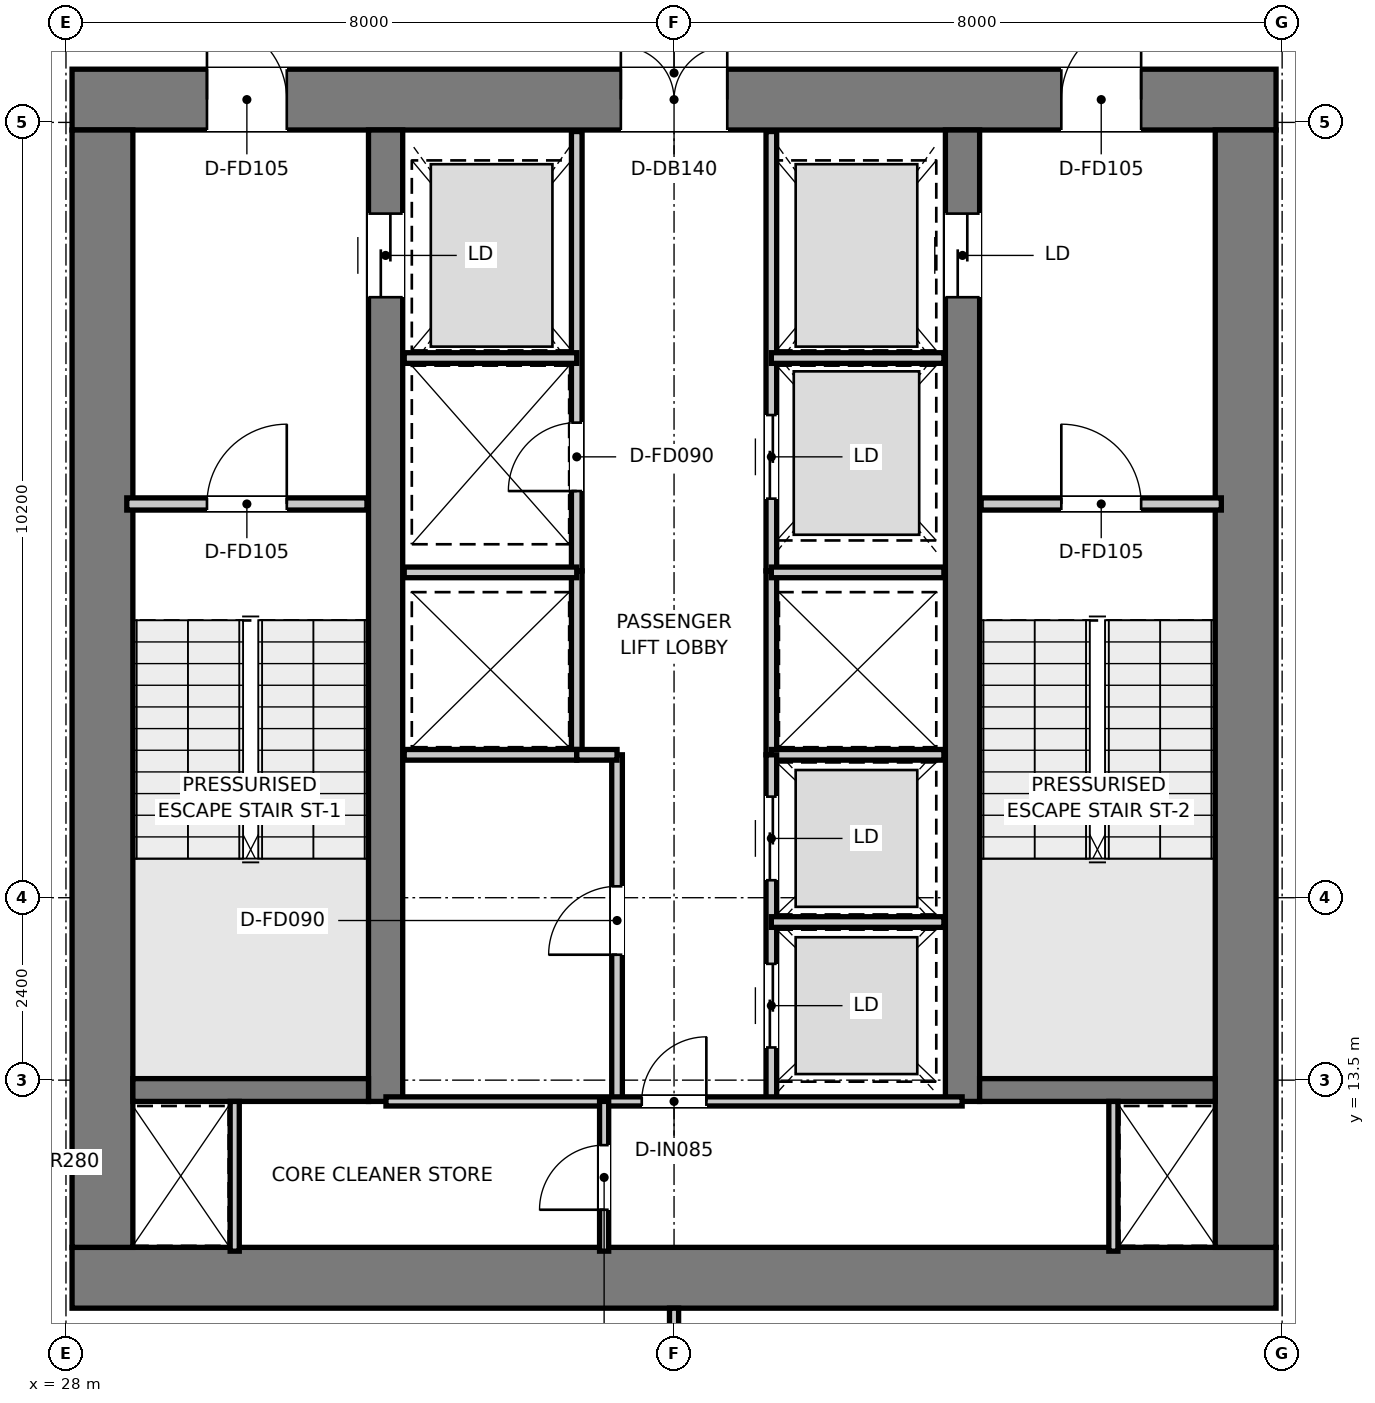
"""IFC4 building model, lengths in metres.
Left out: names, types, materials, properties, quantities, classifications, styles, units other than length and angle.
Written with IfcOpenShell. Run it as: python <this file> out.ifc"""

import sys

from ifc_helpers import new_model, si_unit, direction, frame, frame_2d, origin, place, context, subcontext, project, spatial, rectangle, extrude, element, fill, save


model = new_model("IFC4")
c1 = context("Model", 3, precision=1e-05, world=origin(), true_north=direction((0.0, 1.0)))
c2 = subcontext(c1, "Body", "Model", "MODEL_VIEW")
j1 = project(units=[si_unit("LENGTHUNIT", "METRE"), si_unit("PLANEANGLEUNIT", "RADIAN")], contexts=[c1])
p1 = place(None, origin())
s1 = spatial("IfcSite", under=j1, at=p1, CompositionType="ELEMENT")
p2 = place(p1, origin())
s2 = spatial("IfcBuilding", under=s1, at=p2, CompositionType="ELEMENT")
p3 = place(p2, frame((0.0, 0.0, 231.0)))
s3 = spatial("IfcBuildingStorey", under=s2, at=p3, CompositionType="ELEMENT", Elevation=231.0)
p4 = place(p3, frame((28.08, 10.9, 0.0), z_axis=(0.0, 0.0, 1.0), x_axis=(1.0, 0.0, 0.0)))
e1 = element("IfcWall", 1, at=p4, inside=s3, PredefinedType="SHEAR", context=c2, shape_type="SweptSolid", body=[
    extrude(rectangle(XDim=15.84, YDim=0.8, at=frame_2d((7.92, 0.0))), origin(), (0.0, 0.0, 1.0), 3.95),
])
p5 = place(p3, frame((28.08, 26.4, 0.0), z_axis=(0.0, 0.0, 1.0), x_axis=(1.0, 0.0, 0.0)))
e2 = element("IfcWall", 2, at=p5, inside=s3, PredefinedType="SHEAR", context=c2, shape_type="SweptSolid", body=[
    extrude(rectangle(XDim=15.84, YDim=0.8, at=frame_2d((7.92, 0.0))), origin(), (0.0, 0.0, 1.0), 3.95),
])
p6 = place(p5, frame((7.22, 0.0, 0.0)))
e3 = element("IfcOpeningElement", 3, at=p6, cuts=e2, PredefinedType="OPENING", context=c2, shape_type="SweptSolid", body=[
    extrude(rectangle(XDim=1.4, YDim=2.2, at=frame_2d((0.7, 1.1))), frame((0.0, 0.41, 0.0), z_axis=(0.0, -1.0, 0.0), x_axis=(1.0, 0.0, 0.0)), (0.0, 0.0, 1.0), 0.82),
])
p7 = place(p5, frame((1.775, 0.0, 0.0)))
e4 = element("IfcOpeningElement", 4, at=p7, cuts=e2, PredefinedType="OPENING", context=c2, shape_type="SweptSolid", body=[
    extrude(rectangle(XDim=1.05, YDim=2.1, at=frame_2d((0.525, 1.05))), frame((0.0, 0.41, 0.0), z_axis=(0.0, -1.0, 0.0), x_axis=(1.0, 0.0, 0.0)), (0.0, 0.0, 1.0), 0.82),
])
p8 = place(p5, frame((13.015, 0.0, 0.0)))
e5 = element("IfcOpeningElement", 5, at=p8, cuts=e2, PredefinedType="OPENING", context=c2, shape_type="SweptSolid", body=[
    extrude(rectangle(XDim=1.05, YDim=2.1, at=frame_2d((0.525, 1.05))), frame((0.0, 0.41, 0.0), z_axis=(0.0, -1.0, 0.0), x_axis=(1.0, 0.0, 0.0)), (0.0, 0.0, 1.0), 0.82),
])
for number, where, z_axis, x_axis in (
    (6, (28.48, 11.3, 0.0), (0.0, 0.0, 1.0), (0.0, 1.0, 0.0)),
    (7, (43.52, 11.3, 0.0), (0.0, 0.0, 1.0), (0.0, 1.0, 0.0)),
):
    element("IfcWall", number, at=place(p3, frame(where, z_axis=z_axis, x_axis=x_axis)), inside=s3, PredefinedType="SHEAR", context=c2, shape_type="SweptSolid", body=[
        extrude(rectangle(XDim=14.7, YDim=0.8, at=frame_2d((7.35, 0.0))), origin(), (0.0, 0.0, 1.0), 3.95),
    ])
p9 = place(p3, frame((32.205, 13.22, 0.0), z_axis=(0.0, 0.0, 1.0), x_axis=(0.0, 1.0, 0.0)))
e8 = element("IfcWall", 8, at=p9, inside=s3, PredefinedType="SHEAR", context=c2, shape_type="SweptSolid", body=[
    extrude(rectangle(XDim=12.78, YDim=0.45, at=frame_2d((6.39, 0.0))), origin(), (0.0, 0.0, 1.0), 3.95),
])
p10 = place(p9, frame((10.58, 0.0, 0.0)))
e9 = element("IfcOpeningElement", 9, at=p10, cuts=e8, PredefinedType="OPENING", context=c2, shape_type="SweptSolid", body=[
    extrude(rectangle(XDim=1.1, YDim=2.15, at=frame_2d((0.55, 1.075))), frame((0.0, 0.235, 0.0), z_axis=(0.0, -1.0, 0.0), x_axis=(1.0, 0.0, 0.0)), (0.0, 0.0, 1.0), 0.47),
])
p11 = place(p3, frame((39.795, 13.22, 0.0), z_axis=(0.0, 0.0, 1.0), x_axis=(0.0, 1.0, 0.0)))
e10 = element("IfcWall", 10, at=p11, inside=s3, PredefinedType="SHEAR", context=c2, shape_type="SweptSolid", body=[
    extrude(rectangle(XDim=12.78, YDim=0.45, at=frame_2d((6.39, 0.0))), origin(), (0.0, 0.0, 1.0), 3.95),
])
p12 = place(p11, frame((10.58, 0.0, 0.0)))
e11 = element("IfcOpeningElement", 11, at=p12, cuts=e10, PredefinedType="OPENING", context=c2, shape_type="SweptSolid", body=[
    extrude(rectangle(XDim=1.1, YDim=2.15, at=frame_2d((0.55, 1.075))), frame((0.0, 0.235, 0.0), z_axis=(0.0, -1.0, 0.0), x_axis=(1.0, 0.0, 0.0)), (0.0, 0.0, 1.0), 0.47),
])
for number, where, z_axis, x_axis in (
    (12, (28.88, 13.37, 0.0), (0.0, 0.0, 1.0), (1.0, 0.0, 0.0)),
    (13, (40.02, 13.37, 0.0), (0.0, 0.0, 1.0), (1.0, 0.0, 0.0)),
):
    element("IfcWall", number, at=place(p3, frame(where, z_axis=z_axis, x_axis=x_axis)), inside=s3, PredefinedType="SHEAR", context=c2, shape_type="SweptSolid", body=[
        extrude(rectangle(XDim=3.1, YDim=0.3, at=frame_2d((1.55, 0.0))), origin(), (0.0, 0.0, 1.0), 3.95),
    ])
p13 = place(p3, frame((28.8, 21.08, 0.0), z_axis=(0.0, 0.0, 1.0), x_axis=(1.0, 0.0, 0.0)))
e14 = element("IfcWall", 14, at=p13, inside=s3, PredefinedType="PARTITIONING", context=c2, shape_type="SweptSolid", body=[
    extrude(rectangle(XDim=3.16, YDim=0.16, at=frame_2d((1.58, 0.0))), origin(), (0.0, 0.0, 1.0), 3.67),
])
p14 = place(p13, frame((1.055, 0.0, 0.0)))
e15 = element("IfcOpeningElement", 15, at=p14, cuts=e14, PredefinedType="OPENING", context=c2, shape_type="SweptSolid", body=[
    extrude(rectangle(XDim=1.05, YDim=2.1, at=frame_2d((0.525, 1.05))), frame((0.0, 0.09, 0.0), z_axis=(0.0, -1.0, 0.0), x_axis=(1.0, 0.0, 0.0)), (0.0, 0.0, 1.0), 0.18),
])
p15 = place(p3, frame((40.04, 21.08, 0.0), z_axis=(0.0, 0.0, 1.0), x_axis=(1.0, 0.0, 0.0)))
e16 = element("IfcWall", 16, at=p15, inside=s3, PredefinedType="PARTITIONING", context=c2, shape_type="SweptSolid", body=[
    extrude(rectangle(XDim=3.16, YDim=0.16, at=frame_2d((1.58, 0.0))), origin(), (0.0, 0.0, 1.0), 3.67),
])
p16 = place(p15, frame((1.055, 0.0, 0.0)))
e17 = element("IfcOpeningElement", 17, at=p16, cuts=e16, PredefinedType="OPENING", context=c2, shape_type="SweptSolid", body=[
    extrude(rectangle(XDim=1.05, YDim=2.1, at=frame_2d((0.525, 1.05))), frame((0.0, 0.09, 0.0), z_axis=(0.0, -1.0, 0.0), x_axis=(1.0, 0.0, 0.0)), (0.0, 0.0, 1.0), 0.18),
])
p17 = place(p3, frame((34.72, 20.2, 0.0), z_axis=(0.0, 0.0, 1.0), x_axis=(0.0, 1.0, 0.0)))
e18 = element("IfcWall", 18, at=p17, inside=s3, PredefinedType="PARTITIONING", context=c2, shape_type="SweptSolid", body=[
    extrude(rectangle(XDim=5.78, YDim=0.14, at=frame_2d((2.89, 0.0))), origin(), (0.0, 0.0, 1.0), 2.67),
])
p18 = place(p17, frame((1.05, 0.0, 0.0)))
e19 = element("IfcOpeningElement", 19, at=p18, cuts=e18, PredefinedType="OPENING", context=c2, shape_type="SweptSolid", body=[
    extrude(rectangle(XDim=0.9, YDim=2.1, at=frame_2d((0.45, 1.05))), frame((0.0, 0.08, 0.0), z_axis=(0.0, -1.0, 0.0), x_axis=(1.0, 0.0, 0.0)), (0.0, 0.0, 1.0), 0.16),
])
p19 = place(p3, frame((37.28, 20.2, 0.0), z_axis=(0.0, 0.0, 1.0), x_axis=(0.0, 1.0, 0.0)))
e20 = element("IfcWall", 20, at=p19, inside=s3, PredefinedType="PARTITIONING", context=c2, shape_type="SweptSolid", body=[
    extrude(rectangle(XDim=5.78, YDim=0.14, at=frame_2d((2.89, 0.0))), origin(), (0.0, 0.0, 1.0), 2.67),
])
p20 = place(p19, frame((0.95, 0.0, 0.0)))
e21 = element("IfcOpeningElement", 21, at=p20, cuts=e20, PredefinedType="OPENING", context=c2, shape_type="SweptSolid", body=[
    extrude(rectangle(XDim=1.1, YDim=2.15, at=frame_2d((0.55, 1.075))), frame((0.0, 0.08, 0.0), z_axis=(0.0, -1.0, 0.0), x_axis=(1.0, 0.0, 0.0)), (0.0, 0.0, 1.0), 0.16),
])
for number, where, z_axis, x_axis in (
    (22, (32.45, 23.0, 0.0), (0.0, 0.0, 1.0), (1.0, 0.0, 0.0)),
    (23, (37.28, 23.0, 0.0), (0.0, 0.0, 1.0), (1.0, 0.0, 0.0)),
):
    element("IfcWall", number, at=place(p3, frame(where, z_axis=z_axis, x_axis=x_axis)), inside=s3, PredefinedType="PARTITIONING", context=c2, shape_type="SweptSolid", body=[
        extrude(rectangle(XDim=2.27, YDim=0.14, at=frame_2d((1.135, 0.0))), origin(), (0.0, 0.0, 1.0), 2.67),
    ])
for number, where, z_axis, x_axis in (
    (24, (34.72, 17.78, 0.0), (0.0, 0.0, 1.0), (0.0, 1.0, 0.0)),
    (25, (37.28, 17.78, 0.0), (0.0, 0.0, 1.0), (0.0, 1.0, 0.0)),
):
    element("IfcWall", number, at=place(p3, frame(where, z_axis=z_axis, x_axis=x_axis)), inside=s3, PredefinedType="PARTITIONING", context=c2, shape_type="SweptSolid", body=[
        extrude(rectangle(XDim=2.42, YDim=0.14, at=frame_2d((1.21, 0.0))), origin(), (0.0, 0.0, 1.0), 3.67),
    ])
for number, where, z_axis, x_axis in (
    (26, (32.45, 17.78, 0.0), (0.0, 0.0, 1.0), (1.0, 0.0, 0.0)),
    (27, (32.45, 20.18, 0.0), (0.0, 0.0, 1.0), (1.0, 0.0, 0.0)),
    (28, (37.28, 17.78, 0.0), (0.0, 0.0, 1.0), (1.0, 0.0, 0.0)),
    (29, (37.28, 20.18, 0.0), (0.0, 0.0, 1.0), (1.0, 0.0, 0.0)),
):
    element("IfcWall", number, at=place(p3, frame(where, z_axis=z_axis, x_axis=x_axis)), inside=s3, PredefinedType="PARTITIONING", context=c2, shape_type="SweptSolid", body=[
        extrude(rectangle(XDim=2.27, YDim=0.14, at=frame_2d((1.135, 0.0))), origin(), (0.0, 0.0, 1.0), 3.67),
    ])
p21 = place(p3, frame((35.25, 13.22, 0.0), z_axis=(0.0, 0.0, 1.0), x_axis=(0.0, 1.0, 0.0)))
e30 = element("IfcWall", 30, at=p21, inside=s3, PredefinedType="PARTITIONING", context=c2, shape_type="SweptSolid", body=[
    extrude(rectangle(XDim=4.56, YDim=0.14, at=frame_2d((2.28, 0.0))), origin(), (0.0, 0.0, 1.0), 3.67),
])
p22 = place(p21, frame((1.93, 0.0, 0.0)))
e31 = element("IfcOpeningElement", 31, at=p22, cuts=e30, PredefinedType="OPENING", context=c2, shape_type="SweptSolid", body=[
    extrude(rectangle(XDim=0.9, YDim=2.1, at=frame_2d((0.45, 1.05))), frame((0.0, 0.08, 0.0), z_axis=(0.0, -1.0, 0.0), x_axis=(1.0, 0.0, 0.0)), (0.0, 0.0, 1.0), 0.16),
])
p23 = place(p3, frame((34.72, 17.78, 0.0), z_axis=(0.0, 0.0, 1.0), x_axis=(1.0, 0.0, 0.0)))
e32 = element("IfcWall", 32, at=p23, inside=s3, PredefinedType="PARTITIONING", context=c2, shape_type="SweptSolid", body=[
    extrude(rectangle(XDim=0.53, YDim=0.14, at=frame_2d((0.265, 0.0))), origin(), (0.0, 0.0, 1.0), 3.67),
])
p24 = place(p3, frame((37.28, 13.22, 0.0), z_axis=(0.0, 0.0, 1.0), x_axis=(0.0, 1.0, 0.0)))
e33 = element("IfcWall", 33, at=p24, inside=s3, PredefinedType="PARTITIONING", context=c2, shape_type="SweptSolid", body=[
    extrude(rectangle(XDim=4.56, YDim=0.14, at=frame_2d((2.28, 0.0))), origin(), (0.0, 0.0, 1.0), 3.67),
])
p25 = place(p24, frame((0.71, 0.0, 0.0)))
e34 = element("IfcOpeningElement", 34, at=p25, cuts=e33, PredefinedType="OPENING", context=c2, shape_type="SweptSolid", body=[
    extrude(rectangle(XDim=1.1, YDim=2.15, at=frame_2d((0.55, 1.075))), frame((0.0, 0.08, 0.0), z_axis=(0.0, -1.0, 0.0), x_axis=(1.0, 0.0, 0.0)), (0.0, 0.0, 1.0), 0.16),
])
p26 = place(p24, frame((2.91, 0.0, 0.0)))
e35 = element("IfcOpeningElement", 35, at=p26, cuts=e33, PredefinedType="OPENING", context=c2, shape_type="SweptSolid", body=[
    extrude(rectangle(XDim=1.1, YDim=2.15, at=frame_2d((0.55, 1.075))), frame((0.0, 0.08, 0.0), z_axis=(0.0, -1.0, 0.0), x_axis=(1.0, 0.0, 0.0)), (0.0, 0.0, 1.0), 0.16),
])
p27 = place(p3, frame((37.28, 15.58, 0.0), z_axis=(0.0, 0.0, 1.0), x_axis=(1.0, 0.0, 0.0)))
e36 = element("IfcWall", 36, at=p27, inside=s3, PredefinedType="PARTITIONING", context=c2, shape_type="SweptSolid", body=[
    extrude(rectangle(XDim=2.27, YDim=0.14, at=frame_2d((1.135, 0.0))), origin(), (0.0, 0.0, 1.0), 3.67),
])
for number, where, z_axis, x_axis in (
    (37, (30.22, 11.25, 0.0), (0.0, 0.0, 1.0), (0.0, 1.0, 0.0)),
    (38, (41.78, 11.25, 0.0), (0.0, 0.0, 1.0), (0.0, 1.0, 0.0)),
):
    element("IfcWall", number, at=place(p3, frame(where, z_axis=z_axis, x_axis=x_axis)), inside=s3, PredefinedType="PARTITIONING", context=c2, shape_type="SweptSolid", body=[
        extrude(rectangle(XDim=1.97, YDim=0.12, at=frame_2d((0.985, 0.0))), origin(), (0.0, 0.0, 1.0), 3.67),
    ])
p28 = place(p3, frame((32.21, 13.22, 0.0), z_axis=(0.0, 0.0, 1.0), x_axis=(1.0, 0.0, 0.0)))
e39 = element("IfcWall", 39, at=p28, inside=s3, PredefinedType="PARTITIONING", context=c2, shape_type="SweptSolid", body=[
    extrude(rectangle(XDim=7.58, YDim=0.12, at=frame_2d((3.79, 0.0))), origin(), (0.0, 0.0, 1.0), 3.67),
])
p29 = place(p28, frame((3.365, 0.0, 0.0)))
e40 = element("IfcOpeningElement", 40, at=p29, cuts=e39, PredefinedType="OPENING", context=c2, shape_type="SweptSolid", body=[
    extrude(rectangle(XDim=0.85, YDim=2.1, at=frame_2d((0.425, 1.05))), frame((0.0, 0.07, 0.0), z_axis=(0.0, -1.0, 0.0), x_axis=(1.0, 0.0, 0.0)), (0.0, 0.0, 1.0), 0.14),
])
p30 = place(p3, frame((35.08, 11.25, 0.0), z_axis=(0.0, 0.0, 1.0), x_axis=(0.0, 1.0, 0.0)))
e41 = element("IfcWall", 41, at=p30, inside=s3, PredefinedType="PARTITIONING", context=c2, shape_type="SweptSolid", body=[
    extrude(rectangle(XDim=1.97, YDim=0.12, at=frame_2d((0.985, 0.0))), origin(), (0.0, 0.0, 1.0), 3.67),
])
p31 = place(p30, frame((0.545, 0.0, 0.0)))
e42 = element("IfcOpeningElement", 42, at=p31, cuts=e41, PredefinedType="OPENING", context=c2, shape_type="SweptSolid", body=[
    extrude(rectangle(XDim=0.85, YDim=2.1, at=frame_2d((0.425, 1.05))), frame((0.0, 0.07, 0.0), z_axis=(0.0, -1.0, 0.0), x_axis=(1.0, 0.0, 0.0)), (0.0, 0.0, 1.0), 0.14),
])
p32 = place(p3, frame((36.0, 4.955, 0.0), z_axis=(0.0, 0.0, 1.0), x_axis=(0.0, 1.0, 0.0)))
e43 = element("IfcWall", 43, at=p32, inside=s3, PredefinedType="PARTITIONING", context=c2, shape_type="SweptSolid", body=[
    extrude(rectangle(XDim=5.545, YDim=0.12, at=frame_2d((2.772, 0.0))), origin(), (0.0, 0.0, 1.0), 3.67),
])
p33 = place(p14, origin())
e44 = element("IfcDoor", 44, at=p33, inside=s3, OperationType="SINGLE_SWING_RIGHT", PredefinedType="DOOR", context=c2, shape_type="SweptSolid", body=[
    extrude(rectangle(XDim=1.05, YDim=2.1, at=frame_2d((0.525, 1.05))), frame((0.0, 0.025, 0.0), z_axis=(0.0, -1.0, 0.0), x_axis=(1.0, 0.0, 0.0)), (0.0, 0.0, 1.0), 0.05),
])
fill(e15, e44)
p34 = place(p16, origin())
e45 = element("IfcDoor", 45, at=p34, inside=s3, OperationType="SINGLE_SWING_LEFT", PredefinedType="DOOR", context=c2, shape_type="SweptSolid", body=[
    extrude(rectangle(XDim=1.05, YDim=2.1, at=frame_2d((0.525, 1.05))), frame((0.0, 0.025, 0.0), z_axis=(0.0, -1.0, 0.0), x_axis=(1.0, 0.0, 0.0)), (0.0, 0.0, 1.0), 0.05),
])
fill(e17, e45)
p35 = place(p6, origin())
e46 = element("IfcDoor", 46, at=p35, inside=s3, OperationType="DOUBLE_DOOR_SINGLE_SWING", PredefinedType="DOOR", context=c2, shape_type="SweptSolid", body=[
    extrude(rectangle(XDim=1.4, YDim=2.2, at=frame_2d((0.7, 1.1))), frame((0.0, 0.025, 0.0), z_axis=(0.0, -1.0, 0.0), x_axis=(1.0, 0.0, 0.0)), (0.0, 0.0, 1.0), 0.05),
])
fill(e3, e46)
p36 = place(p7, origin())
e47 = element("IfcDoor", 47, at=p36, inside=s3, OperationType="SINGLE_SWING_LEFT", PredefinedType="DOOR", context=c2, shape_type="SweptSolid", body=[
    extrude(rectangle(XDim=1.05, YDim=2.1, at=frame_2d((0.525, 1.05))), frame((0.0, 0.025, 0.0), z_axis=(0.0, -1.0, 0.0), x_axis=(1.0, 0.0, 0.0)), (0.0, 0.0, 1.0), 0.05),
])
fill(e4, e47)
p37 = place(p8, origin())
e48 = element("IfcDoor", 48, at=p37, inside=s3, OperationType="SINGLE_SWING_RIGHT", PredefinedType="DOOR", context=c2, shape_type="SweptSolid", body=[
    extrude(rectangle(XDim=1.05, YDim=2.1, at=frame_2d((0.525, 1.05))), frame((0.0, 0.025, 0.0), z_axis=(0.0, -1.0, 0.0), x_axis=(1.0, 0.0, 0.0)), (0.0, 0.0, 1.0), 0.05),
])
fill(e5, e48)
p38 = place(p10, origin())
e49 = element("IfcDoor", 49, at=p38, inside=s3, OperationType="DOUBLE_DOOR_SLIDING", PredefinedType="DOOR", context=c2, shape_type="SweptSolid", body=[
    extrude(rectangle(XDim=1.1, YDim=2.15, at=frame_2d((0.55, 1.075))), frame((0.0, 0.025, 0.0), z_axis=(0.0, -1.0, 0.0), x_axis=(1.0, 0.0, 0.0)), (0.0, 0.0, 1.0), 0.05),
])
fill(e9, e49)
p39 = place(p12, origin())
e50 = element("IfcDoor", 50, at=p39, inside=s3, OperationType="DOUBLE_DOOR_SLIDING", PredefinedType="DOOR", context=c2, shape_type="SweptSolid", body=[
    extrude(rectangle(XDim=1.1, YDim=2.15, at=frame_2d((0.55, 1.075))), frame((0.0, 0.025, 0.0), z_axis=(0.0, -1.0, 0.0), x_axis=(1.0, 0.0, 0.0)), (0.0, 0.0, 1.0), 0.05),
])
fill(e11, e50)
p40 = place(p18, origin())
e51 = element("IfcDoor", 51, at=p40, inside=s3, OperationType="SINGLE_SWING_LEFT", PredefinedType="DOOR", context=c2, shape_type="SweptSolid", body=[
    extrude(rectangle(XDim=0.9, YDim=2.1, at=frame_2d((0.45, 1.05))), frame((0.0, 0.025, 0.0), z_axis=(0.0, -1.0, 0.0), x_axis=(1.0, 0.0, 0.0)), (0.0, 0.0, 1.0), 0.05),
])
fill(e19, e51)
p41 = place(p20, origin())
e52 = element("IfcDoor", 52, at=p41, inside=s3, OperationType="DOUBLE_DOOR_SLIDING", PredefinedType="DOOR", context=c2, shape_type="SweptSolid", body=[
    extrude(rectangle(XDim=1.1, YDim=2.15, at=frame_2d((0.55, 1.075))), frame((0.0, 0.025, 0.0), z_axis=(0.0, -1.0, 0.0), x_axis=(1.0, 0.0, 0.0)), (0.0, 0.0, 1.0), 0.05),
])
fill(e21, e52)
p42 = place(p22, origin())
e53 = element("IfcDoor", 53, at=p42, inside=s3, OperationType="SINGLE_SWING_LEFT", PredefinedType="DOOR", context=c2, shape_type="SweptSolid", body=[
    extrude(rectangle(XDim=0.9, YDim=2.1, at=frame_2d((0.45, 1.05))), frame((0.0, 0.025, 0.0), z_axis=(0.0, -1.0, 0.0), x_axis=(1.0, 0.0, 0.0)), (0.0, 0.0, 1.0), 0.05),
])
fill(e31, e53)
p43 = place(p25, origin())
e54 = element("IfcDoor", 54, at=p43, inside=s3, OperationType="DOUBLE_DOOR_SLIDING", PredefinedType="DOOR", context=c2, shape_type="SweptSolid", body=[
    extrude(rectangle(XDim=1.1, YDim=2.15, at=frame_2d((0.55, 1.075))), frame((0.0, 0.025, 0.0), z_axis=(0.0, -1.0, 0.0), x_axis=(1.0, 0.0, 0.0)), (0.0, 0.0, 1.0), 0.05),
])
fill(e34, e54)
p44 = place(p26, origin())
e55 = element("IfcDoor", 55, at=p44, inside=s3, OperationType="DOUBLE_DOOR_SLIDING", PredefinedType="DOOR", context=c2, shape_type="SweptSolid", body=[
    extrude(rectangle(XDim=1.1, YDim=2.15, at=frame_2d((0.55, 1.075))), frame((0.0, 0.025, 0.0), z_axis=(0.0, -1.0, 0.0), x_axis=(1.0, 0.0, 0.0)), (0.0, 0.0, 1.0), 0.05),
])
fill(e35, e55)
p45 = place(p29, origin())
e56 = element("IfcDoor", 56, at=p45, inside=s3, OperationType="SINGLE_SWING_RIGHT", PredefinedType="DOOR", context=c2, shape_type="SweptSolid", body=[
    extrude(rectangle(XDim=0.85, YDim=2.1, at=frame_2d((0.425, 1.05))), frame((0.0, 0.025, 0.0), z_axis=(0.0, -1.0, 0.0), x_axis=(1.0, 0.0, 0.0)), (0.0, 0.0, 1.0), 0.05),
])
fill(e40, e56)
p46 = place(p31, origin())
e57 = element("IfcDoor", 57, at=p46, inside=s3, OperationType="SINGLE_SWING_LEFT", PredefinedType="DOOR", context=c2, shape_type="SweptSolid", body=[
    extrude(rectangle(XDim=0.85, YDim=2.1, at=frame_2d((0.425, 1.05))), frame((0.0, 0.025, 0.0), z_axis=(0.0, -1.0, 0.0), x_axis=(1.0, 0.0, 0.0)), (0.0, 0.0, 1.0), 0.05),
])
fill(e42, e57)
save(model, sys.argv[1])
